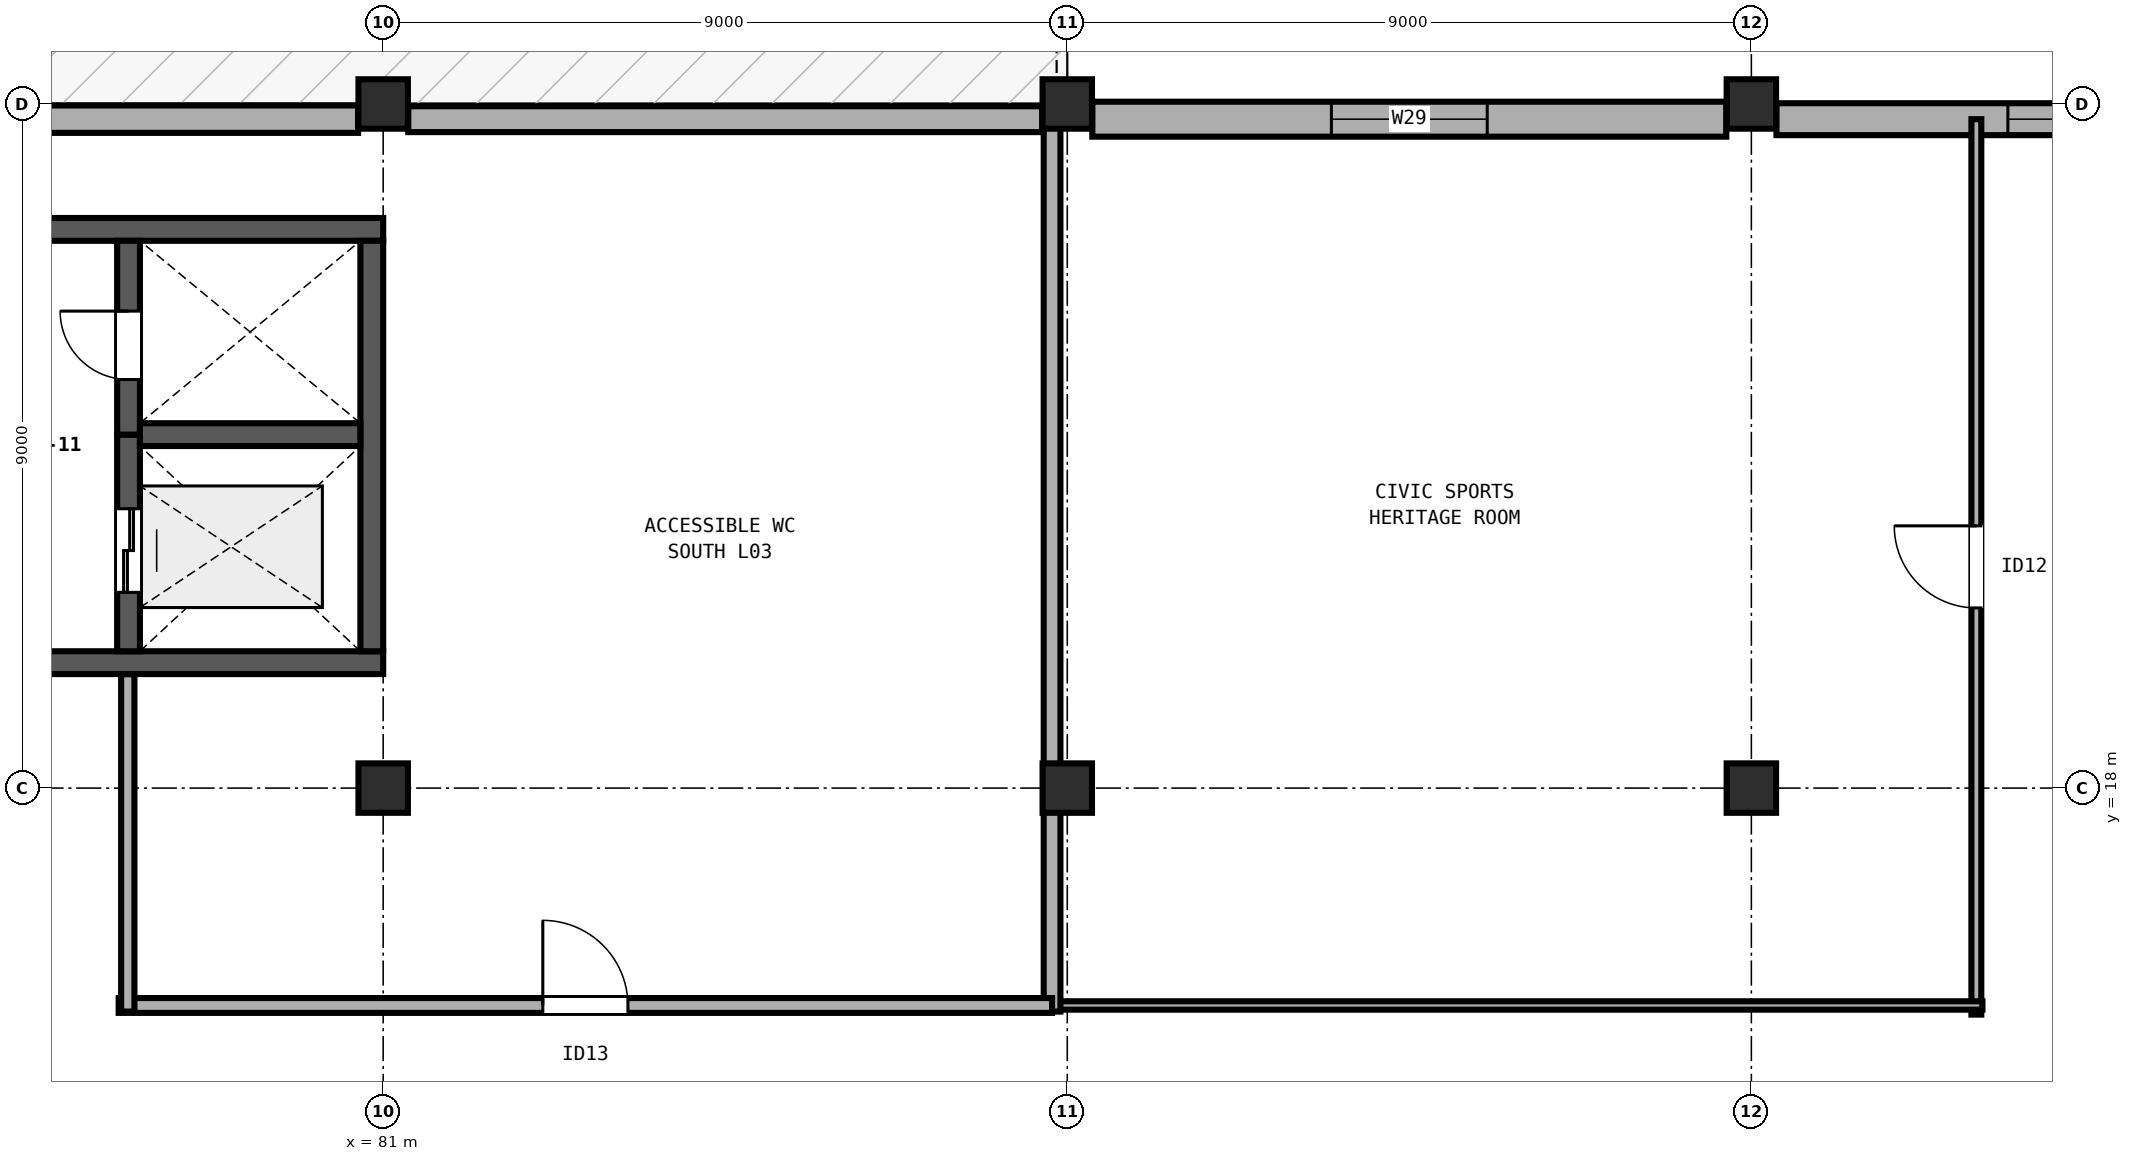
"""IFC4 building model, lengths in metres.
Left out: names, types, materials, properties, quantities, classifications, styles, units other than length and angle.
Written with IfcOpenShell. Run it as: python <this file> out.ifc"""

import sys

from ifc_helpers import new_model, si_unit, direction, frame, frame_2d, origin, origin_2d, place, context, subcontext, project, spatial, rectangle, extrude, element, fill, save


model = new_model("IFC4")
c1 = context("Model", 3, precision=1e-05, world=origin(), true_north=direction((0.0, 1.0)))
c2 = subcontext(c1, "Body", "Model", "MODEL_VIEW")
j1 = project(units=[si_unit("LENGTHUNIT", "METRE"), si_unit("PLANEANGLEUNIT", "RADIAN")], contexts=[c1])
p1 = place(None, origin())
s1 = spatial("IfcSite", under=j1, at=p1, CompositionType="ELEMENT")
p2 = place(p1, origin())
s2 = spatial("IfcBuilding", under=s1, at=p2, CompositionType="ELEMENT")
p3 = place(p2, frame((0.0, 0.0, 14.4)))
s3 = spatial("IfcBuildingStorey", under=s2, at=p3, CompositionType="ELEMENT", Elevation=14.4)
for number, where, z_axis, x_axis in (
    (1, (81.0, 18.0, 0.0), (0.0, 0.0, 1.0), (1.0, 0.0, 0.0)),
    (2, (81.0, 27.0, 0.0), (0.0, 0.0, 1.0), (1.0, 0.0, 0.0)),
    (3, (90.0, 18.0, 0.0), (0.0, 0.0, 1.0), (1.0, 0.0, 0.0)),
    (4, (90.0, 27.0, 0.0), (0.0, 0.0, 1.0), (1.0, 0.0, 0.0)),
    (5, (99.0, 18.0, 0.0), (0.0, 0.0, 1.0), (1.0, 0.0, 0.0)),
    (6, (99.0, 27.0, 0.0), (0.0, 0.0, 1.0), (1.0, 0.0, 0.0)),
):
    element("IfcColumn", number, at=place(p3, frame(where, z_axis=z_axis, x_axis=x_axis)), inside=s3, PredefinedType="COLUMN", context=c2, shape_type="SweptSolid", body=[
        extrude(rectangle(XDim=0.65, YDim=0.65, at=origin_2d()), origin(), (0.0, 0.0, 1.0), 4.8),
    ])
p4 = place(p3, frame((63.0, 19.65, 0.0), z_axis=(0.0, 0.0, 1.0), x_axis=(1.0, 0.0, 0.0)))
e7 = element("IfcWall", 7, at=p4, inside=s3, PredefinedType="SHEAR", context=c2, shape_type="SweptSolid", body=[
    extrude(rectangle(XDim=18.0, YDim=0.3, at=frame_2d((9.0, 0.0))), origin(), (0.0, 0.0, 1.0), 4.555),
])
p5 = place(p4, frame((11.4, 0.0, 0.0)))
e8 = element("IfcOpeningElement", 8, at=p5, cuts=e7, PredefinedType="OPENING", context=c2, shape_type="SweptSolid", body=[
    extrude(rectangle(XDim=1.9, YDim=2.25, at=frame_2d((0.95, 1.125))), frame((0.0, 0.16, 0.0), z_axis=(0.0, -1.0, 0.0), x_axis=(1.0, 0.0, 0.0)), (0.0, 0.0, 1.0), 0.32),
])
p6 = place(p3, frame((81.0, 25.35, 0.0), z_axis=(0.0, 0.0, 1.0), x_axis=(-1.0, 0.0, 0.0)))
e9 = element("IfcWall", 9, at=p6, inside=s3, PredefinedType="SHEAR", context=c2, shape_type="SweptSolid", body=[
    extrude(rectangle(XDim=18.0, YDim=0.3, at=frame_2d((9.0, 0.0))), origin(), (0.0, 0.0, 1.0), 4.555),
])
p7 = place(p3, frame((80.85, 19.8, 0.0), z_axis=(0.0, 0.0, 1.0), x_axis=(0.0, 1.0, 0.0)))
e10 = element("IfcWall", 10, at=p7, inside=s3, PredefinedType="SHEAR", context=c2, shape_type="SweptSolid", body=[
    extrude(rectangle(XDim=5.4, YDim=0.3, at=frame_2d((2.7, 0.0))), origin(), (0.0, 0.0, 1.0), 4.555),
])
p8 = place(p3, frame((77.65, 19.8, 0.0), z_axis=(0.0, 0.0, 1.0), x_axis=(0.0, 1.0, 0.0)))
e11 = element("IfcWall", 11, at=p8, inside=s3, PredefinedType="SHEAR", context=c2, shape_type="SweptSolid", body=[
    extrude(rectangle(XDim=2.85, YDim=0.3, at=frame_2d((1.425, 0.0))), origin(), (0.0, 0.0, 1.0), 4.555),
])
p9 = place(p8, frame((0.775, 0.0, 0.0)))
e12 = element("IfcOpeningElement", 12, at=p9, cuts=e11, PredefinedType="OPENING", context=c2, shape_type="SweptSolid", body=[
    extrude(rectangle(XDim=1.1, YDim=2.1, at=frame_2d((0.55, 1.05))), frame((0.0, 0.16, 0.0), z_axis=(0.0, -1.0, 0.0), x_axis=(1.0, 0.0, 0.0)), (0.0, 0.0, 1.0), 0.32),
])
p10 = place(p3, frame((77.65, 22.65, 0.0), z_axis=(0.0, 0.0, 1.0), x_axis=(0.0, 1.0, 0.0)))
e13 = element("IfcWall", 13, at=p10, inside=s3, PredefinedType="SHEAR", context=c2, shape_type="SweptSolid", body=[
    extrude(rectangle(XDim=2.55, YDim=0.3, at=frame_2d((1.275, 0.0))), origin(), (0.0, 0.0, 1.0), 4.555),
])
p11 = place(p10, frame((0.725, 0.0, 0.0)))
e14 = element("IfcOpeningElement", 14, at=p11, cuts=e13, PredefinedType="OPENING", context=c2, shape_type="SweptSolid", body=[
    extrude(rectangle(XDim=0.9, YDim=2.1, at=frame_2d((0.45, 1.05))), frame((0.0, 0.16, 0.0), z_axis=(0.0, -1.0, 0.0), x_axis=(1.0, 0.0, 0.0)), (0.0, 0.0, 1.0), 0.32),
])
p12 = place(p3, frame((77.8, 22.65, 0.0), z_axis=(0.0, 0.0, 1.0), x_axis=(1.0, 0.0, 0.0)))
e15 = element("IfcWall", 15, at=p12, inside=s3, PredefinedType="SHEAR", context=c2, shape_type="SweptSolid", body=[
    extrude(rectangle(XDim=2.9, YDim=0.3, at=frame_2d((1.45, 0.0))), origin(), (0.0, 0.0, 1.0), 4.555),
])
p13 = place(p3, frame((72.33, 26.8, 0.0), z_axis=(0.0, 0.0, 1.0), x_axis=(1.0, 0.0, 0.0)))
e16 = element("IfcWall", 16, at=p13, inside=s3, PredefinedType="SOLIDWALL", context=c2, shape_type="SweptSolid", body=[
    extrude(rectangle(XDim=8.34, YDim=0.36, at=frame_2d((4.17, 0.0))), origin(), (0.0, 0.0, 1.0), 3.58),
])
p14 = place(p3, frame((81.33, 26.8, 0.0), z_axis=(0.0, 0.0, 1.0), x_axis=(1.0, 0.0, 0.0)))
e17 = element("IfcWall", 17, at=p14, inside=s3, PredefinedType="SOLIDWALL", context=c2, shape_type="SweptSolid", body=[
    extrude(rectangle(XDim=8.34, YDim=0.34, at=frame_2d((4.17, 0.0))), origin(), (0.0, 0.0, 1.0), 3.58),
])
p15 = place(p3, frame((90.33, 26.8, 0.0), z_axis=(0.0, 0.0, 1.0), x_axis=(1.0, 0.0, 0.0)))
e18 = element("IfcWall", 18, at=p15, inside=s3, PredefinedType="SOLIDWALL", context=c2, shape_type="SweptSolid", body=[
    extrude(rectangle(XDim=8.34, YDim=0.46, at=frame_2d((4.17, 0.0))), origin(), (0.0, 0.0, 1.0), 3.58),
])
p16 = place(p15, frame((3.145, 0.0, 0.9)))
e19 = element("IfcOpeningElement", 19, at=p16, cuts=e18, PredefinedType="OPENING", context=c2, shape_type="SweptSolid", body=[
    extrude(rectangle(XDim=2.05, YDim=2.0, at=frame_2d((1.025, 1.0))), frame((0.0, 0.24, 0.0), z_axis=(0.0, -1.0, 0.0), x_axis=(1.0, 0.0, 0.0)), (0.0, 0.0, 1.0), 0.48),
])
p17 = place(p3, frame((99.33, 26.8, 0.0), z_axis=(0.0, 0.0, 1.0), x_axis=(1.0, 0.0, 0.0)))
e20 = element("IfcWall", 20, at=p17, inside=s3, PredefinedType="SOLIDWALL", context=c2, shape_type="SweptSolid", body=[
    extrude(rectangle(XDim=8.34, YDim=0.42, at=frame_2d((4.17, 0.0))), origin(), (0.0, 0.0, 1.0), 3.58),
])
p18 = place(p17, frame((3.045, 0.0, 0.9)))
e21 = element("IfcOpeningElement", 21, at=p18, cuts=e20, PredefinedType="OPENING", context=c2, shape_type="SweptSolid", body=[
    extrude(rectangle(XDim=2.25, YDim=2.05, at=frame_2d((1.125, 1.025))), frame((0.0, 0.22, 0.0), z_axis=(0.0, -1.0, 0.0), x_axis=(1.0, 0.0, 0.0)), (0.0, 0.0, 1.0), 0.44),
])
p19 = place(p3, frame((101.96, 15.02, 0.0), z_axis=(0.0, 0.0, 1.0), x_axis=(0.0, 1.0, 0.0)))
e22 = element("IfcWall", 22, at=p19, inside=s3, PredefinedType="PARTITIONING", context=c2, shape_type="SweptSolid", body=[
    extrude(rectangle(XDim=11.78, YDim=0.13, at=frame_2d((5.89, 0.0))), origin(), (0.0, 0.0, 1.0), 3.56),
])
p20 = place(p19, frame((5.35, 0.0, 0.0)))
e23 = element("IfcOpeningElement", 23, at=p20, cuts=e22, PredefinedType="OPENING", context=c2, shape_type="SweptSolid", body=[
    extrude(rectangle(XDim=1.08, YDim=2.18, at=frame_2d((0.54, 1.09))), frame((0.0, 0.075, 0.0), z_axis=(0.0, -1.0, 0.0), x_axis=(1.0, 0.0, 0.0)), (0.0, 0.0, 1.0), 0.15),
])
p21 = place(p3, frame((102.04, 15.14, 0.0), z_axis=(0.0, 0.0, 1.0), x_axis=(-1.0, 0.0, 0.0)))
e24 = element("IfcWall", 24, at=p21, inside=s3, PredefinedType="PARTITIONING", context=c2, shape_type="SweptSolid", body=[
    extrude(rectangle(XDim=12.2, YDim=0.11, at=frame_2d((6.1, 0.0))), origin(), (0.0, 0.0, 1.0), 3.56),
])
p22 = place(p3, frame((89.8, 15.06, 0.0), z_axis=(0.0, 0.0, 1.0), x_axis=(0.0, 1.0, 0.0)))
e25 = element("IfcWall", 25, at=p22, inside=s3, PredefinedType="PARTITIONING", context=c2, shape_type="SweptSolid", body=[
    extrude(rectangle(XDim=11.7, YDim=0.22, at=frame_2d((5.85, 0.0))), origin(), (0.0, 0.0, 1.0), 3.56),
])
p23 = place(p3, frame((77.52, 15.14, 0.0), z_axis=(0.0, 0.0, 1.0), x_axis=(1.0, 0.0, 0.0)))
e26 = element("IfcWall", 26, at=p23, inside=s3, PredefinedType="PARTITIONING", context=c2, shape_type="SweptSolid", body=[
    extrude(rectangle(XDim=12.28, YDim=0.195, at=frame_2d((6.14, 0.0))), origin(), (0.0, 0.0, 1.0), 3.56),
])
p24 = place(p23, frame((5.58, 0.0, 0.0)))
e27 = element("IfcOpeningElement", 27, at=p24, cuts=e26, PredefinedType="OPENING", context=c2, shape_type="SweptSolid", body=[
    extrude(rectangle(XDim=1.12, YDim=2.22, at=frame_2d((0.56, 1.11))), frame((0.0, 0.107, 0.0), z_axis=(0.0, -1.0, 0.0), x_axis=(1.0, 0.0, 0.0)), (0.0, 0.0, 1.0), 0.215),
])
p25 = place(p3, frame((77.64, 15.06, 0.0), z_axis=(0.0, 0.0, 1.0), x_axis=(0.0, 1.0, 0.0)))
e28 = element("IfcWall", 28, at=p25, inside=s3, PredefinedType="PARTITIONING", context=c2, shape_type="SweptSolid", body=[
    extrude(rectangle(XDim=4.438, YDim=0.175, at=frame_2d((2.219, 0.0))), origin(), (0.0, 0.0, 1.0), 3.56),
])
p26 = place(p16, origin())
e29 = element("IfcWindow", 29, at=p26, inside=s3, PartitioningType="DOUBLE_PANEL_VERTICAL", PredefinedType="WINDOW", context=c2, shape_type="SweptSolid", body=[
    extrude(rectangle(XDim=2.05, YDim=2.0, at=frame_2d((1.025, 1.0))), frame((0.0, 0.03, 0.0), z_axis=(0.0, -1.0, 0.0), x_axis=(1.0, 0.0, 0.0)), (0.0, 0.0, 1.0), 0.06),
])
fill(e19, e29)
p27 = place(p18, origin())
e30 = element("IfcWindow", 30, at=p27, inside=s3, PartitioningType="DOUBLE_PANEL_VERTICAL", PredefinedType="WINDOW", context=c2, shape_type="SweptSolid", body=[
    extrude(rectangle(XDim=2.25, YDim=2.05, at=frame_2d((1.125, 1.025))), frame((0.0, 0.03, 0.0), z_axis=(0.0, -1.0, 0.0), x_axis=(1.0, 0.0, 0.0)), (0.0, 0.0, 1.0), 0.06),
])
fill(e21, e30)
p28 = place(p11, origin())
e31 = element("IfcDoor", 31, at=p28, inside=s3, OperationType="SINGLE_SWING_RIGHT", PredefinedType="DOOR", context=c2, shape_type="SweptSolid", body=[
    extrude(rectangle(XDim=0.9, YDim=2.1, at=frame_2d((0.45, 1.05))), frame((0.0, 0.025, 0.0), z_axis=(0.0, -1.0, 0.0), x_axis=(1.0, 0.0, 0.0)), (0.0, 0.0, 1.0), 0.05),
])
fill(e14, e31)
p29 = place(p9, origin())
e32 = element("IfcDoor", 32, at=p29, inside=s3, OperationType="DOUBLE_DOOR_SLIDING", PredefinedType="DOOR", context=c2, shape_type="SweptSolid", body=[
    extrude(rectangle(XDim=1.1, YDim=2.1, at=frame_2d((0.55, 1.05))), frame((0.0, 0.025, 0.0), z_axis=(0.0, -1.0, 0.0), x_axis=(1.0, 0.0, 0.0)), (0.0, 0.0, 1.0), 0.05),
])
fill(e12, e32)
p30 = place(p20, origin())
e33 = element("IfcDoor", 33, at=p30, inside=s3, OperationType="SINGLE_SWING_RIGHT", PredefinedType="DOOR", context=c2, shape_type="SweptSolid", body=[
    extrude(rectangle(XDim=1.08, YDim=2.18, at=frame_2d((0.54, 1.09))), frame((0.0, 0.025, 0.0), z_axis=(0.0, -1.0, 0.0), x_axis=(1.0, 0.0, 0.0)), (0.0, 0.0, 1.0), 0.05),
])
fill(e23, e33)
p31 = place(p24, origin())
e34 = element("IfcDoor", 34, at=p31, inside=s3, OperationType="SINGLE_SWING_LEFT", PredefinedType="DOOR", context=c2, shape_type="SweptSolid", body=[
    extrude(rectangle(XDim=1.12, YDim=2.22, at=frame_2d((0.56, 1.11))), frame((0.0, 0.025, 0.0), z_axis=(0.0, -1.0, 0.0), x_axis=(1.0, 0.0, 0.0)), (0.0, 0.0, 1.0), 0.05),
])
fill(e27, e34)
save(model, sys.argv[1])
